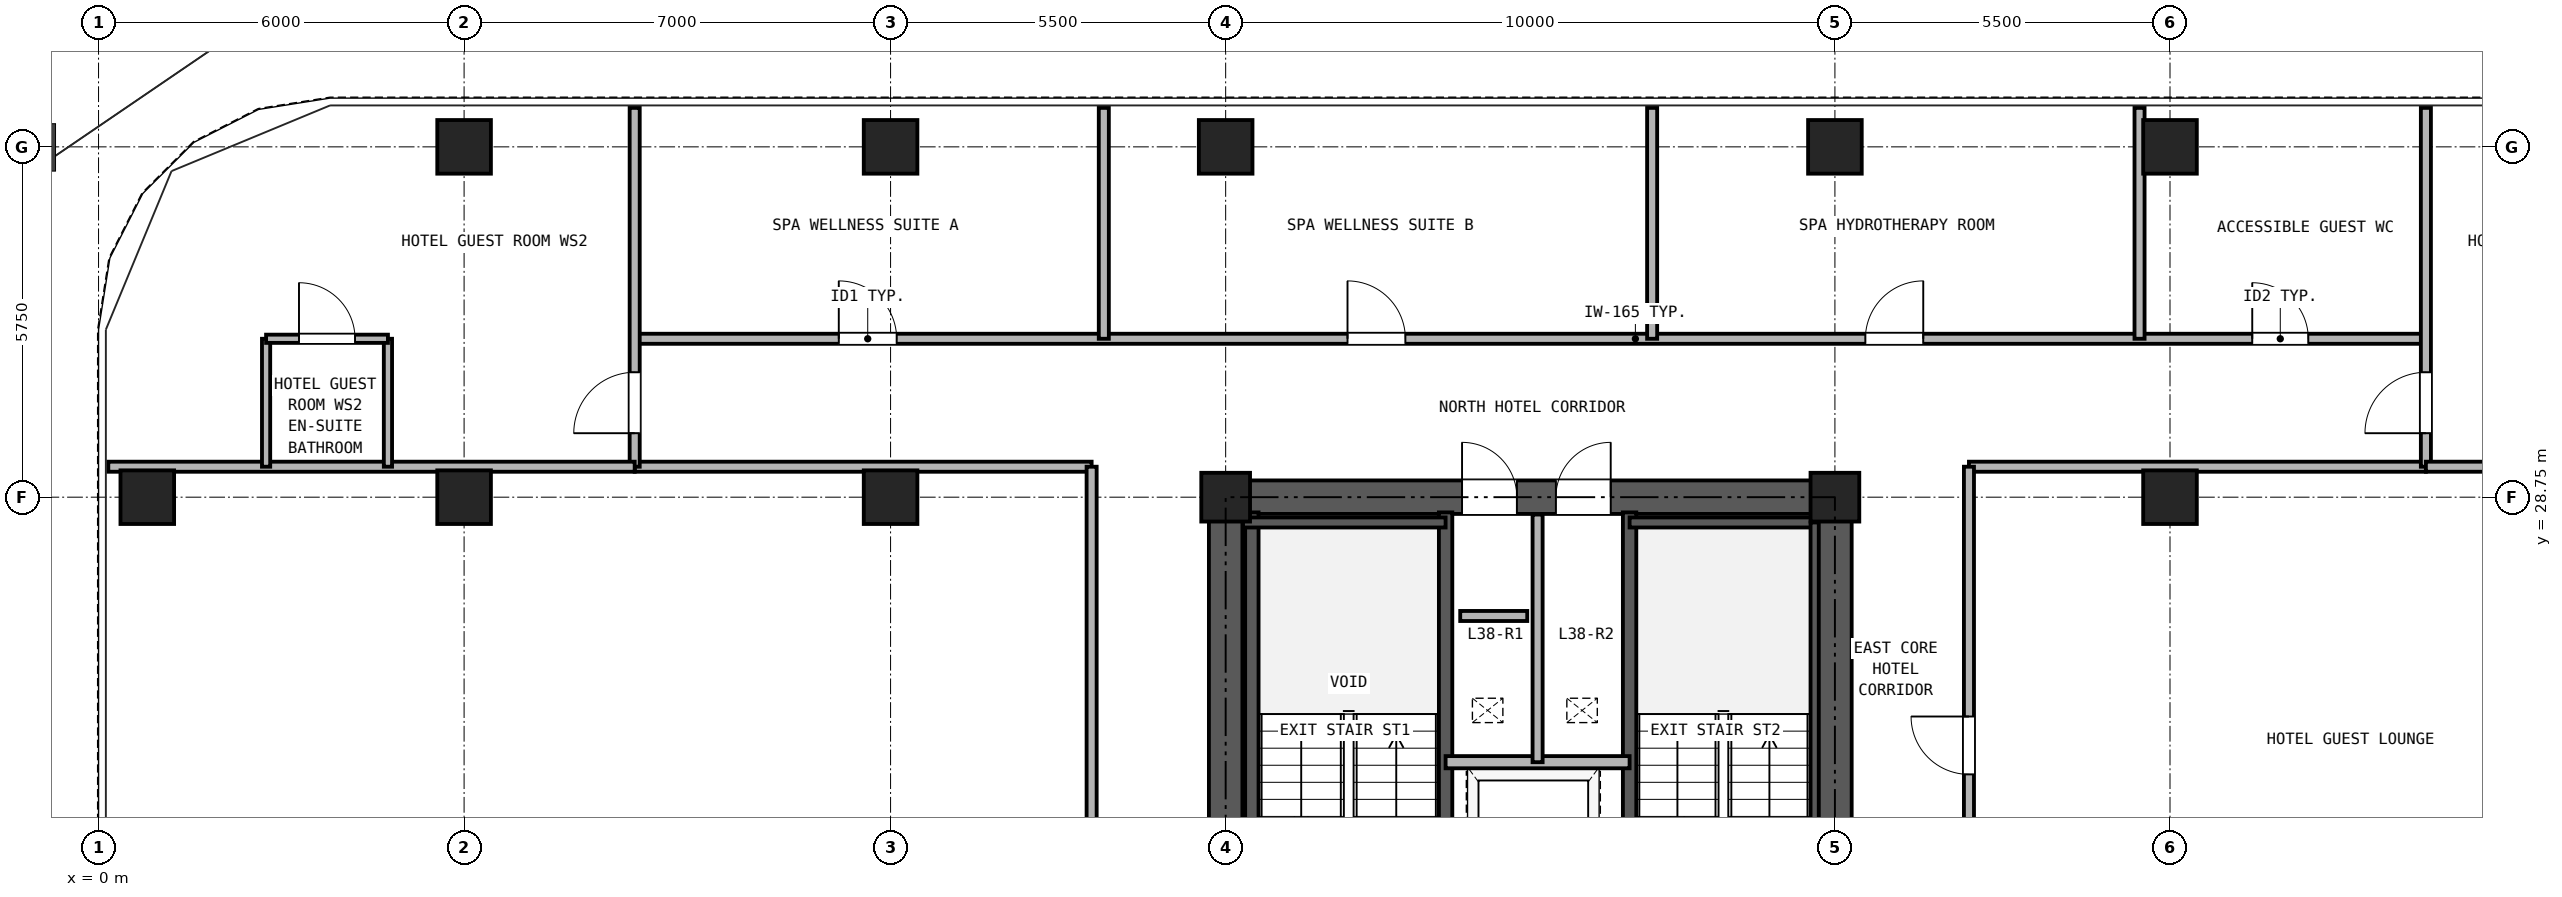
"""IFC4 building model, lengths in metres.
Left out: names, types, materials, properties, quantities, classifications, styles, units other than length and angle.
Written with IfcOpenShell. Run it as: python <this file> out.ifc"""

import sys

from ifc_helpers import new_model, si_unit, direction, frame, frame_2d, origin, origin_2d, place, context, subcontext, project, spatial, rectangle, hollow_rectangle, extrude, source, transform, mapped, element, fill, save


model = new_model("IFC4")
c1 = context("Model", 3, precision=1e-05, world=origin(), true_north=direction((0.0, 1.0)))
c2 = subcontext(c1, "Body", "Model", "MODEL_VIEW")
j1 = project(units=[si_unit("LENGTHUNIT", "METRE"), si_unit("PLANEANGLEUNIT", "RADIAN")], contexts=[c1])
p1 = place(None, origin())
s1 = spatial("IfcSite", under=j1, at=p1, CompositionType="ELEMENT")
p2 = place(p1, origin())
s2 = spatial("IfcBuilding", under=s1, at=p2, CompositionType="ELEMENT")
p3 = place(p2, frame((0.0, 0.0, 137.5)))
s3 = spatial("IfcBuildingStorey", under=s2, at=p3, CompositionType="ELEMENT", Elevation=137.5)
m1 = source(origin(), c2, "Body", "SweptSolid", [
    extrude(hollow_rectangle(XDim=0.88, YDim=0.88, WallThickness=0.05, at=origin_2d()), origin(), (0.0, 0.0, 1.0), 2.95),
])
for number, where, z_axis, x_axis in (
    (1, (6.0, 34.5, 0.0), (0.0, 0.0, 1.0), (1.0, 0.0, 0.0)),
    (2, (13.0, 34.5, 0.0), (0.0, 0.0, 1.0), (1.0, 0.0, 0.0)),
    (3, (18.5, 34.5, 0.0), (0.0, 0.0, 1.0), (1.0, 0.0, 0.0)),
    (4, (28.5, 34.5, 0.0), (0.0, 0.0, 1.0), (1.0, 0.0, 0.0)),
    (5, (34.0, 34.5, 0.0), (0.0, 0.0, 1.0), (1.0, 0.0, 0.0)),
    (6, (0.8, 28.75, 0.0), (0.0, 0.0, 1.0), (1.0, 0.0, 0.0)),
    (7, (6.0, 28.75, 0.0), (0.0, 0.0, 1.0), (1.0, 0.0, 0.0)),
    (8, (13.0, 28.75, 0.0), (0.0, 0.0, 1.0), (1.0, 0.0, 0.0)),
):
    element("IfcColumn", number, at=place(p3, frame(where, z_axis=z_axis, x_axis=x_axis)), inside=s3, PredefinedType="COLUMN", context=c2, shape_type="MappedRepresentation", body=[
        mapped(m1, transform((0.0, 0.0, 0.0), x_axis=(1.0, 0.0, 0.0), y_axis=(0.0, 1.0, 0.0), z_axis=(0.0, 0.0, 1.0), scale=1.0)),
    ])
m2 = source(origin(), c2, "Body", "SweptSolid", [
    extrude(hollow_rectangle(XDim=0.8, YDim=0.8, WallThickness=0.045, at=origin_2d()), origin(), (0.0, 0.0, 1.0), 2.95),
])
for number, where, z_axis, x_axis in (
    (9, (18.5, 28.75, 0.0), (0.0, 0.0, 1.0), (1.0, 0.0, 0.0)),
    (10, (28.5, 28.75, 0.0), (0.0, 0.0, 1.0), (1.0, 0.0, 0.0)),
):
    element("IfcColumn", number, at=place(p3, frame(where, z_axis=z_axis, x_axis=x_axis)), inside=s3, PredefinedType="COLUMN", context=c2, shape_type="MappedRepresentation", body=[
        mapped(m2, transform((0.0, 0.0, 0.0), x_axis=(1.0, 0.0, 0.0), y_axis=(0.0, 1.0, 0.0), z_axis=(0.0, 0.0, 1.0), scale=1.0)),
    ])
p4 = place(p3, frame((34.0, 28.75, 0.0), z_axis=(0.0, 0.0, 1.0), x_axis=(1.0, 0.0, 0.0)))
e11 = element("IfcColumn", 11, at=p4, inside=s3, PredefinedType="COLUMN", context=c2, shape_type="MappedRepresentation", body=[
    mapped(m1, transform((0.0, 0.0, 0.0), x_axis=(1.0, 0.0, 0.0), y_axis=(0.0, 1.0, 0.0), z_axis=(0.0, 0.0, 1.0), scale=1.0)),
])
p5 = place(p3, frame((18.225, 28.75, 0.0), z_axis=(0.0, 0.0, 1.0), x_axis=(1.0, 0.0, 0.0)))
e12 = element("IfcWall", 12, at=p5, inside=s3, PredefinedType="SHEAR", context=c2, shape_type="SweptSolid", body=[
    extrude(rectangle(XDim=10.55, YDim=0.55, at=frame_2d((5.275, 0.0))), origin(), (0.0, 0.0, 1.0), 2.95),
])
p6 = place(p5, frame((4.155, 0.0, 0.0)))
e13 = element("IfcOpeningElement", 13, at=p6, cuts=e12, PredefinedType="OPENING", context=c2, shape_type="SweptSolid", body=[
    extrude(rectangle(XDim=0.9, YDim=2.05, at=frame_2d((0.45, 1.025))), frame((0.0, 0.285, 0.0), z_axis=(0.0, -1.0, 0.0), x_axis=(1.0, 0.0, 0.0)), (0.0, 0.0, 1.0), 0.57),
])
p7 = place(p5, frame((5.695, 0.0, 0.0)))
e14 = element("IfcOpeningElement", 14, at=p7, cuts=e12, PredefinedType="OPENING", context=c2, shape_type="SweptSolid", body=[
    extrude(rectangle(XDim=0.9, YDim=2.05, at=frame_2d((0.45, 1.025))), frame((0.0, 0.285, 0.0), z_axis=(0.0, -1.0, 0.0), x_axis=(1.0, 0.0, 0.0)), (0.0, 0.0, 1.0), 0.57),
])
p8 = place(p3, frame((18.5, 11.775, 0.0), z_axis=(0.0, 0.0, 1.0), x_axis=(0.0, 1.0, 0.0)))
e15 = element("IfcWall", 15, at=p8, inside=s3, PredefinedType="SHEAR", context=c2, shape_type="SweptSolid", body=[
    extrude(rectangle(XDim=16.7, YDim=0.55, at=frame_2d((8.35, 0.0))), origin(), (0.0, 0.0, 1.0), 2.95),
])
p9 = place(p8, frame((7.375, 0.0, 0.0)))
e16 = element("IfcOpeningElement", 16, at=p9, cuts=e15, PredefinedType="OPENING", context=c2, shape_type="SweptSolid", body=[
    extrude(rectangle(XDim=1.15, YDim=2.2, at=frame_2d((0.575, 1.1))), frame((0.0, 0.285, 0.0), z_axis=(0.0, -1.0, 0.0), x_axis=(1.0, 0.0, 0.0)), (0.0, 0.0, 1.0), 0.57),
])
p10 = place(p3, frame((28.5, 11.775, 0.0), z_axis=(0.0, 0.0, 1.0), x_axis=(0.0, 1.0, 0.0)))
e17 = element("IfcWall", 17, at=p10, inside=s3, PredefinedType="SHEAR", context=c2, shape_type="SweptSolid", body=[
    extrude(rectangle(XDim=16.7, YDim=0.55, at=frame_2d((8.35, 0.0))), origin(), (0.0, 0.0, 1.0), 2.95),
])
p11 = place(p10, frame((7.375, 0.0, 0.0)))
e18 = element("IfcOpeningElement", 18, at=p11, cuts=e17, PredefinedType="OPENING", context=c2, shape_type="SweptSolid", body=[
    extrude(rectangle(XDim=1.15, YDim=2.2, at=frame_2d((0.575, 1.1))), frame((0.0, 0.285, 0.0), z_axis=(0.0, -1.0, 0.0), x_axis=(1.0, 0.0, 0.0)), (0.0, 0.0, 1.0), 0.57),
])
for number, where, z_axis, x_axis in (
    (19, (18.93, 21.39, 0.0), (0.0, 0.0, 1.0), (0.0, 1.0, 0.0)),
    (20, (22.11, 21.39, 0.0), (0.0, 0.0, 1.0), (0.0, 1.0, 0.0)),
    (21, (25.13, 21.39, 0.0), (0.0, 0.0, 1.0), (0.0, 1.0, 0.0)),
):
    element("IfcWall", number, at=place(p3, frame(where, z_axis=z_axis, x_axis=x_axis)), inside=s3, PredefinedType="SOLIDWALL", context=c2, shape_type="SweptSolid", body=[
        extrude(rectangle(XDim=7.11, YDim=0.22, at=frame_2d((3.555, 0.0))), origin(), (0.0, 0.0, 1.0), 2.95),
    ])
p12 = place(p3, frame((18.785, 28.335, 0.0), z_axis=(0.0, 0.0, 1.0), x_axis=(1.0, 0.0, 0.0)))
e22 = element("IfcWall", 22, at=p12, inside=s3, PredefinedType="PARTITIONING", context=c2, shape_type="SweptSolid", body=[
    extrude(rectangle(XDim=3.325, YDim=0.165, at=frame_2d((1.663, 0.0))), origin(), (0.0, 0.0, 1.0), 2.95),
])
p13 = place(p3, frame((25.13, 28.335, 0.0), z_axis=(0.0, 0.0, 1.0), x_axis=(1.0, 0.0, 0.0)))
e23 = element("IfcWall", 23, at=p13, inside=s3, PredefinedType="PARTITIONING", context=c2, shape_type="SweptSolid", body=[
    extrude(rectangle(XDim=3.085, YDim=0.165, at=frame_2d((1.542, 0.0))), origin(), (0.0, 0.0, 1.0), 2.95),
])
p14 = place(p3, frame((28.167, 21.39, 0.0), z_axis=(0.0, 0.0, 1.0), x_axis=(0.0, 1.0, 0.0)))
e24 = element("IfcWall", 24, at=p14, inside=s3, PredefinedType="PARTITIONING", context=c2, shape_type="SweptSolid", body=[
    extrude(rectangle(XDim=6.945, YDim=0.135, at=frame_2d((3.473, 0.0))), origin(), (0.0, 0.0, 1.0), 2.95),
])
p15 = place(p3, frame((22.11, 24.4, 0.0), z_axis=(0.0, 0.0, 1.0), x_axis=(1.0, 0.0, 0.0)))
e25 = element("IfcWall", 25, at=p15, inside=s3, PredefinedType="PARTITIONING", context=c2, shape_type="SweptSolid", body=[
    extrude(rectangle(XDim=3.02, YDim=0.2, at=frame_2d((1.51, 0.0))), origin(), (0.0, 0.0, 1.0), 2.95),
])
p16 = place(p3, frame((23.62, 24.4, 0.0), z_axis=(0.0, 0.0, 1.0), x_axis=(0.0, 1.0, 0.0)))
e26 = element("IfcWall", 26, at=p16, inside=s3, PredefinedType="PARTITIONING", context=c2, shape_type="SweptSolid", body=[
    extrude(rectangle(XDim=4.065, YDim=0.165, at=frame_2d((2.033, 0.0))), origin(), (0.0, 0.0, 1.0), 2.95),
])
p17 = place(p3, frame((8.8, 31.35, 0.0), z_axis=(0.0, 0.0, 1.0), x_axis=(1.0, 0.0, 0.0)))
e27 = element("IfcWall", 27, at=p17, inside=s3, PredefinedType="PARTITIONING", context=c2, shape_type="SweptSolid", body=[
    extrude(rectangle(XDim=29.4, YDim=0.165, at=frame_2d((14.7, 0.0))), origin(), (0.0, 0.0, 1.0), 2.95),
])
p18 = place(p17, frame((3.35, 0.0, 0.0)))
e28 = element("IfcOpeningElement", 28, at=p18, cuts=e27, PredefinedType="OPENING", context=c2, shape_type="SweptSolid", body=[
    extrude(rectangle(XDim=0.95, YDim=2.15, at=frame_2d((0.475, 1.075))), frame((0.0, 0.093, 0.0), z_axis=(0.0, -1.0, 0.0), x_axis=(1.0, 0.0, 0.0)), (0.0, 0.0, 1.0), 0.185),
])
p19 = place(p17, frame((11.7, 0.0, 0.0)))
e29 = element("IfcOpeningElement", 29, at=p19, cuts=e27, PredefinedType="OPENING", context=c2, shape_type="SweptSolid", body=[
    extrude(rectangle(XDim=0.95, YDim=2.15, at=frame_2d((0.475, 1.075))), frame((0.0, 0.093, 0.0), z_axis=(0.0, -1.0, 0.0), x_axis=(1.0, 0.0, 0.0)), (0.0, 0.0, 1.0), 0.185),
])
p20 = place(p17, frame((20.2, 0.0, 0.0)))
e30 = element("IfcOpeningElement", 30, at=p20, cuts=e27, PredefinedType="OPENING", context=c2, shape_type="SweptSolid", body=[
    extrude(rectangle(XDim=0.95, YDim=2.15, at=frame_2d((0.475, 1.075))), frame((0.0, 0.093, 0.0), z_axis=(0.0, -1.0, 0.0), x_axis=(1.0, 0.0, 0.0)), (0.0, 0.0, 1.0), 0.185),
])
p21 = place(p17, frame((26.55, 0.0, 0.0)))
e31 = element("IfcOpeningElement", 31, at=p21, cuts=e27, PredefinedType="OPENING", context=c2, shape_type="SweptSolid", body=[
    extrude(rectangle(XDim=0.92, YDim=2.1, at=frame_2d((0.46, 1.05))), frame((0.0, 0.093, 0.0), z_axis=(0.0, -1.0, 0.0), x_axis=(1.0, 0.0, 0.0)), (0.0, 0.0, 1.0), 0.185),
])
for number, where, z_axis, x_axis in (
    (32, (8.8, 29.25, 0.0), (0.0, 0.0, 1.0), (1.0, 0.0, 0.0)),
    (33, (30.7, 29.25, 0.0), (0.0, 0.0, 1.0), (1.0, 0.0, 0.0)),
):
    element("IfcWall", number, at=place(p3, frame(where, z_axis=z_axis, x_axis=x_axis)), inside=s3, PredefinedType="PARTITIONING", context=c2, shape_type="SweptSolid", body=[
        extrude(rectangle(XDim=7.5, YDim=0.165, at=frame_2d((3.75, 0.0))), origin(), (0.0, 0.0, 1.0), 2.95),
    ])
p22 = place(p3, frame((16.3, 11.05, 0.0), z_axis=(0.0, 0.0, 1.0), x_axis=(0.0, 1.0, 0.0)))
e34 = element("IfcWall", 34, at=p22, inside=s3, PredefinedType="PARTITIONING", context=c2, shape_type="SweptSolid", body=[
    extrude(rectangle(XDim=18.2, YDim=0.165, at=frame_2d((9.1, 0.0))), origin(), (0.0, 0.0, 1.0), 2.95),
])
p23 = place(p22, frame((8.6, 0.0, 0.0)))
e35 = element("IfcOpeningElement", 35, at=p23, cuts=e34, PredefinedType="OPENING", context=c2, shape_type="SweptSolid", body=[
    extrude(rectangle(XDim=0.95, YDim=2.15, at=frame_2d((0.475, 1.075))), frame((0.0, 0.093, 0.0), z_axis=(0.0, -1.0, 0.0), x_axis=(1.0, 0.0, 0.0)), (0.0, 0.0, 1.0), 0.185),
])
p24 = place(p3, frame((30.7, 11.05, 0.0), z_axis=(0.0, 0.0, 1.0), x_axis=(0.0, 1.0, 0.0)))
e36 = element("IfcWall", 36, at=p24, inside=s3, PredefinedType="PARTITIONING", context=c2, shape_type="SweptSolid", body=[
    extrude(rectangle(XDim=18.2, YDim=0.165, at=frame_2d((9.1, 0.0))), origin(), (0.0, 0.0, 1.0), 2.95),
])
p25 = place(p24, frame((4.05, 0.0, 0.0)))
e37 = element("IfcOpeningElement", 37, at=p25, cuts=e36, PredefinedType="OPENING", context=c2, shape_type="SweptSolid", body=[
    extrude(rectangle(XDim=0.95, YDim=2.15, at=frame_2d((0.475, 1.075))), frame((0.0, 0.093, 0.0), z_axis=(0.0, -1.0, 0.0), x_axis=(1.0, 0.0, 0.0)), (0.0, 0.0, 1.0), 0.185),
])
p26 = place(p24, frame((13.15, 0.0, 0.0)))
e38 = element("IfcOpeningElement", 38, at=p26, cuts=e36, PredefinedType="OPENING", context=c2, shape_type="SweptSolid", body=[
    extrude(rectangle(XDim=0.95, YDim=2.15, at=frame_2d((0.475, 1.075))), frame((0.0, 0.093, 0.0), z_axis=(0.0, -1.0, 0.0), x_axis=(1.0, 0.0, 0.0)), (0.0, 0.0, 1.0), 0.185),
])
p27 = place(p3, frame((8.8, 29.25, 0.0), z_axis=(0.0, 0.0, 1.0), x_axis=(0.0, 1.0, 0.0)))
e39 = element("IfcWall", 39, at=p27, inside=s3, PredefinedType="PARTITIONING", context=c2, shape_type="SweptSolid", body=[
    extrude(rectangle(XDim=5.89, YDim=0.165, at=frame_2d((2.945, 0.0))), origin(), (0.0, 0.0, 1.0), 2.95),
])
p28 = place(p27, frame((0.55, 0.0, 0.0)))
e40 = element("IfcOpeningElement", 40, at=p28, cuts=e39, PredefinedType="OPENING", context=c2, shape_type="SweptSolid", body=[
    extrude(rectangle(XDim=1.0, YDim=2.15, at=frame_2d((0.5, 1.075))), frame((0.0, 0.093, 0.0), z_axis=(0.0, -1.0, 0.0), x_axis=(1.0, 0.0, 0.0)), (0.0, 0.0, 1.0), 0.185),
])
p29 = place(p3, frame((38.2, 29.25, 0.0), z_axis=(0.0, 0.0, 1.0), x_axis=(0.0, 1.0, 0.0)))
e41 = element("IfcWall", 41, at=p29, inside=s3, PredefinedType="PARTITIONING", context=c2, shape_type="SweptSolid", body=[
    extrude(rectangle(XDim=5.89, YDim=0.165, at=frame_2d((2.945, 0.0))), origin(), (0.0, 0.0, 1.0), 2.95),
])
p30 = place(p29, frame((0.55, 0.0, 0.0)))
e42 = element("IfcOpeningElement", 42, at=p30, cuts=e41, PredefinedType="OPENING", context=c2, shape_type="SweptSolid", body=[
    extrude(rectangle(XDim=1.0, YDim=2.15, at=frame_2d((0.5, 1.075))), frame((0.0, 0.093, 0.0), z_axis=(0.0, -1.0, 0.0), x_axis=(1.0, 0.0, 0.0)), (0.0, 0.0, 1.0), 0.185),
])
for number, where, z_axis, x_axis in (
    (43, (0.16, 29.25, 0.0), (0.0, 0.0, 1.0), (1.0, 0.0, 0.0)),
    (44, (38.2, 29.25, 0.0), (0.0, 0.0, 1.0), (1.0, 0.0, 0.0)),
):
    element("IfcWall", number, at=place(p3, frame(where, z_axis=z_axis, x_axis=x_axis)), inside=s3, PredefinedType="PARTITIONING", context=c2, shape_type="SweptSolid", body=[
        extrude(rectangle(XDim=8.64, YDim=0.165, at=frame_2d((4.32, 0.0))), origin(), (0.0, 0.0, 1.0), 2.95),
    ])
for number, where, z_axis, x_axis in (
    (45, (2.75, 29.25, 0.0), (0.0, 0.0, 1.0), (0.0, 1.0, 0.0)),
    (46, (4.75, 29.25, 0.0), (0.0, 0.0, 1.0), (0.0, 1.0, 0.0)),
):
    element("IfcWall", number, at=place(p3, frame(where, z_axis=z_axis, x_axis=x_axis)), inside=s3, PredefinedType="PARTITIONING", context=c2, shape_type="SweptSolid", body=[
        extrude(rectangle(XDim=2.1, YDim=0.135, at=frame_2d((1.05, 0.0))), origin(), (0.0, 0.0, 1.0), 2.95),
    ])
p31 = place(p3, frame((2.75, 31.35, 0.0), z_axis=(0.0, 0.0, 1.0), x_axis=(1.0, 0.0, 0.0)))
e47 = element("IfcWall", 47, at=p31, inside=s3, PredefinedType="PARTITIONING", context=c2, shape_type="SweptSolid", body=[
    extrude(rectangle(XDim=2.0, YDim=0.135, at=frame_2d((1.0, 0.0))), origin(), (0.0, 0.0, 1.0), 2.95),
])
p32 = place(p31, frame((0.54, 0.0, 0.0)))
e48 = element("IfcOpeningElement", 48, at=p32, cuts=e47, PredefinedType="OPENING", context=c2, shape_type="SweptSolid", body=[
    extrude(rectangle(XDim=0.92, YDim=2.1, at=frame_2d((0.46, 1.05))), frame((0.0, 0.077, 0.0), z_axis=(0.0, -1.0, 0.0), x_axis=(1.0, 0.0, 0.0)), (0.0, 0.0, 1.0), 0.155),
])
for number, where, z_axis, x_axis in (
    (49, (16.5, 31.35, 0.0), (0.0, 0.0, 1.0), (0.0, 1.0, 0.0)),
    (50, (25.5, 31.35, 0.0), (0.0, 0.0, 1.0), (0.0, 1.0, 0.0)),
    (51, (33.5, 31.35, 0.0), (0.0, 0.0, 1.0), (0.0, 1.0, 0.0)),
):
    element("IfcWall", number, at=place(p3, frame(where, z_axis=z_axis, x_axis=x_axis)), inside=s3, PredefinedType="PARTITIONING", context=c2, shape_type="SweptSolid", body=[
        extrude(rectangle(XDim=3.79, YDim=0.165, at=frame_2d((1.895, 0.0))), origin(), (0.0, 0.0, 1.0), 2.95),
    ])
p33 = place(p3, frame((22.35, 26.8, 0.0), z_axis=(0.0, 0.0, 1.0), x_axis=(1.0, 0.0, 0.0)))
e52 = element("IfcWall", 52, at=p33, inside=s3, PredefinedType="PARTITIONING", context=c2, shape_type="SweptSolid", body=[
    extrude(rectangle(XDim=1.1, YDim=0.165, at=frame_2d((0.55, 0.0))), origin(), (0.0, 0.0, 1.0), 2.95),
])
p34 = place(p6, origin())
e53 = element("IfcDoor", 53, at=p34, inside=s3, OperationType="SINGLE_SWING_LEFT", PredefinedType="DOOR", context=c2, shape_type="SweptSolid", body=[
    extrude(rectangle(XDim=0.9, YDim=2.05, at=frame_2d((0.45, 1.025))), frame((0.0, 0.025, 0.0), z_axis=(0.0, -1.0, 0.0), x_axis=(1.0, 0.0, 0.0)), (0.0, 0.0, 1.0), 0.05),
])
fill(e13, e53)
p35 = place(p7, origin())
e54 = element("IfcDoor", 54, at=p35, inside=s3, OperationType="SINGLE_SWING_RIGHT", PredefinedType="DOOR", context=c2, shape_type="SweptSolid", body=[
    extrude(rectangle(XDim=0.9, YDim=2.05, at=frame_2d((0.45, 1.025))), frame((0.0, 0.025, 0.0), z_axis=(0.0, -1.0, 0.0), x_axis=(1.0, 0.0, 0.0)), (0.0, 0.0, 1.0), 0.05),
])
fill(e14, e54)
p36 = place(p32, frame((0.92, 0.0, 0.0), z_axis=(0.0, 0.0, 1.0), x_axis=(-1.0, 0.0, 0.0)))
e55 = element("IfcDoor", 55, at=p36, inside=s3, OperationType="SINGLE_SWING_LEFT", PredefinedType="DOOR", context=c2, shape_type="SweptSolid", body=[
    extrude(rectangle(XDim=0.92, YDim=2.1, at=frame_2d((0.46, 1.05))), frame((0.0, 0.025, 0.0), z_axis=(0.0, -1.0, 0.0), x_axis=(1.0, 0.0, 0.0)), (0.0, 0.0, 1.0), 0.05),
])
fill(e48, e55)
p37 = place(p28, origin())
e56 = element("IfcDoor", 56, at=p37, inside=s3, OperationType="SINGLE_SWING_LEFT", PredefinedType="DOOR", context=c2, shape_type="SweptSolid", body=[
    extrude(rectangle(XDim=1.0, YDim=2.15, at=frame_2d((0.5, 1.075))), frame((0.0, 0.025, 0.0), z_axis=(0.0, -1.0, 0.0), x_axis=(1.0, 0.0, 0.0)), (0.0, 0.0, 1.0), 0.05),
])
fill(e40, e56)
p38 = place(p30, frame((1.0, 0.0, 0.0), z_axis=(0.0, 0.0, 1.0), x_axis=(-1.0, 0.0, 0.0)))
e57 = element("IfcDoor", 57, at=p38, inside=s3, OperationType="SINGLE_SWING_LEFT", PredefinedType="DOOR", context=c2, shape_type="SweptSolid", body=[
    extrude(rectangle(XDim=1.0, YDim=2.15, at=frame_2d((0.5, 1.075))), frame((0.0, 0.025, 0.0), z_axis=(0.0, -1.0, 0.0), x_axis=(1.0, 0.0, 0.0)), (0.0, 0.0, 1.0), 0.05),
])
fill(e42, e57)
p39 = place(p18, origin())
e58 = element("IfcDoor", 58, at=p39, inside=s3, OperationType="SINGLE_SWING_LEFT", PredefinedType="DOOR", context=c2, shape_type="SweptSolid", body=[
    extrude(rectangle(XDim=0.95, YDim=2.15, at=frame_2d((0.475, 1.075))), frame((0.0, 0.025, 0.0), z_axis=(0.0, -1.0, 0.0), x_axis=(1.0, 0.0, 0.0)), (0.0, 0.0, 1.0), 0.05),
])
fill(e28, e58)
p40 = place(p19, origin())
e59 = element("IfcDoor", 59, at=p40, inside=s3, OperationType="SINGLE_SWING_LEFT", PredefinedType="DOOR", context=c2, shape_type="SweptSolid", body=[
    extrude(rectangle(XDim=0.95, YDim=2.15, at=frame_2d((0.475, 1.075))), frame((0.0, 0.025, 0.0), z_axis=(0.0, -1.0, 0.0), x_axis=(1.0, 0.0, 0.0)), (0.0, 0.0, 1.0), 0.05),
])
fill(e29, e59)
p41 = place(p20, origin())
e60 = element("IfcDoor", 60, at=p41, inside=s3, OperationType="SINGLE_SWING_RIGHT", PredefinedType="DOOR", context=c2, shape_type="SweptSolid", body=[
    extrude(rectangle(XDim=0.95, YDim=2.15, at=frame_2d((0.475, 1.075))), frame((0.0, 0.025, 0.0), z_axis=(0.0, -1.0, 0.0), x_axis=(1.0, 0.0, 0.0)), (0.0, 0.0, 1.0), 0.05),
])
fill(e30, e60)
p42 = place(p21, origin())
e61 = element("IfcDoor", 61, at=p42, inside=s3, OperationType="SINGLE_SWING_LEFT", PredefinedType="DOOR", context=c2, shape_type="SweptSolid", body=[
    extrude(rectangle(XDim=0.92, YDim=2.1, at=frame_2d((0.46, 1.05))), frame((0.0, 0.025, 0.0), z_axis=(0.0, -1.0, 0.0), x_axis=(1.0, 0.0, 0.0)), (0.0, 0.0, 1.0), 0.05),
])
fill(e31, e61)
p43 = place(p26, origin())
e62 = element("IfcDoor", 62, at=p43, inside=s3, OperationType="SINGLE_SWING_RIGHT", PredefinedType="DOOR", context=c2, shape_type="SweptSolid", body=[
    extrude(rectangle(XDim=0.95, YDim=2.15, at=frame_2d((0.475, 1.075))), frame((0.0, 0.025, 0.0), z_axis=(0.0, -1.0, 0.0), x_axis=(1.0, 0.0, 0.0)), (0.0, 0.0, 1.0), 0.05),
])
fill(e38, e62)
save(model, sys.argv[1])
